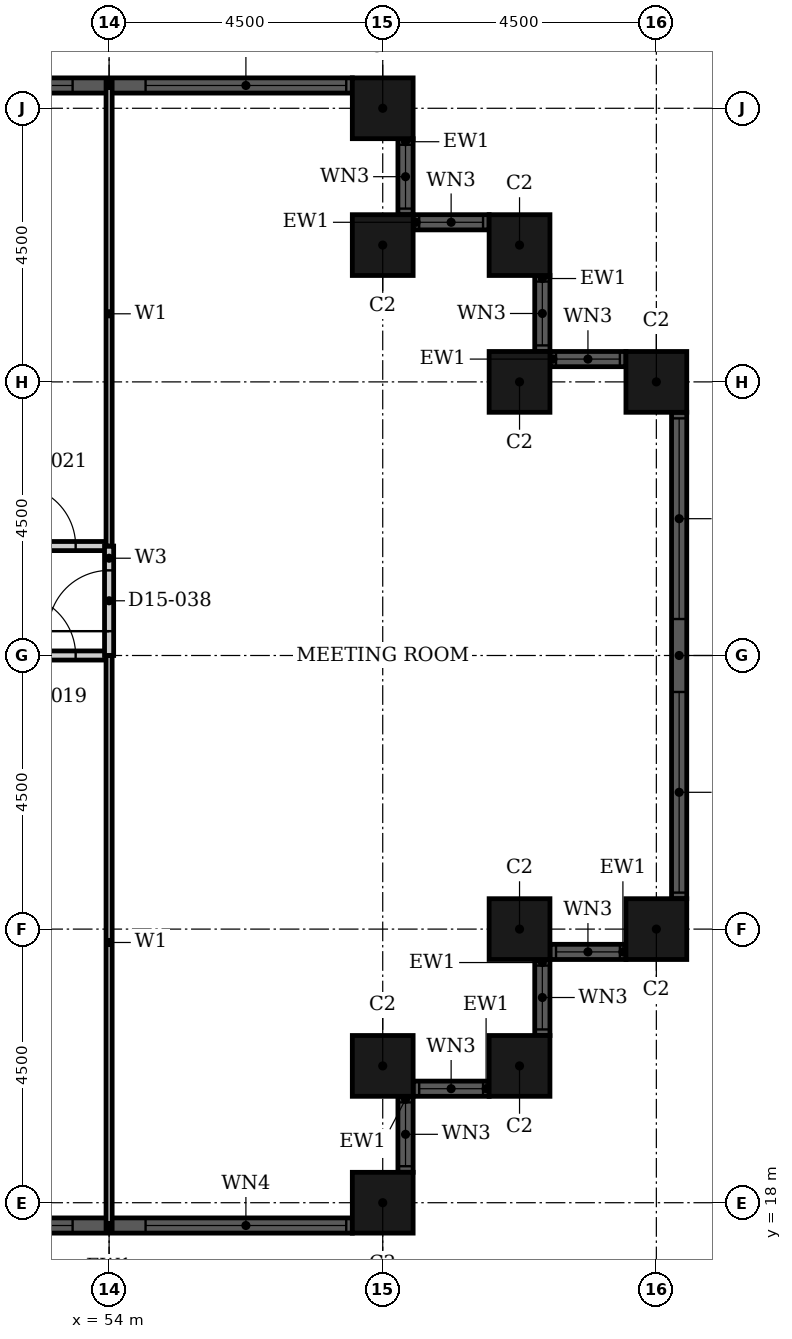
"""IFC4 building model, lengths in metres.
Left out: names, types, materials, properties, quantities, classifications, styles, units other than length and angle.
Written with IfcOpenShell. Run it as: python <this file> out.ifc"""

import sys

from ifc_helpers import new_model, si_unit, direction, frame, frame_2d, origin, origin_2d, place, context, subcontext, project, spatial, rectangle, hollow_rectangle, extrude, element, fill, save


model = new_model("IFC4")
c1 = context("Model", 3, precision=1e-05, world=origin(), true_north=direction((0.0, 1.0)))
c2 = subcontext(c1, "Body", "Model", "MODEL_VIEW")
j1 = project(units=[si_unit("LENGTHUNIT", "METRE"), si_unit("PLANEANGLEUNIT", "RADIAN")], contexts=[c1])
p1 = place(None, origin())
s1 = spatial("IfcSite", under=j1, at=p1, CompositionType="ELEMENT")
p2 = place(p1, origin())
s2 = spatial("IfcBuilding", under=s1, at=p2, CompositionType="ELEMENT")
p3 = place(p2, frame((0.0, 0.0, 67.2)))
s3 = spatial("IfcBuildingStorey", under=s2, at=p3, CompositionType="ELEMENT", Elevation=67.2)
for number, where, z_axis, x_axis in (
    (1, (58.5, 18.0, 0.0), (0.0, 0.0, 1.0), (1.0, 0.0, 0.0)),
    (2, (58.5, 20.25, 0.0), (0.0, 0.0, 1.0), (1.0, 0.0, 0.0)),
    (3, (60.75, 20.25, 0.0), (0.0, 0.0, 1.0), (1.0, 0.0, 0.0)),
    (4, (60.75, 22.5, 0.0), (0.0, 0.0, 1.0), (1.0, 0.0, 0.0)),
    (5, (63.0, 22.5, 0.0), (0.0, 0.0, 1.0), (1.0, 0.0, 0.0)),
    (6, (63.0, 31.5, 0.0), (0.0, 0.0, 1.0), (1.0, 0.0, 0.0)),
    (7, (60.75, 31.5, 0.0), (0.0, 0.0, 1.0), (1.0, 0.0, 0.0)),
    (8, (60.75, 33.75, 0.0), (0.0, 0.0, 1.0), (1.0, 0.0, 0.0)),
    (9, (58.5, 33.75, 0.0), (0.0, 0.0, 1.0), (1.0, 0.0, 0.0)),
    (10, (58.5, 36.0, 0.0), (0.0, 0.0, 1.0), (1.0, 0.0, 0.0)),
):
    element("IfcColumn", number, at=place(p3, frame(where, z_axis=z_axis, x_axis=x_axis)), inside=s3, PredefinedType="COLUMN", context=c2, shape_type="SweptSolid", body=[
        extrude(hollow_rectangle(XDim=1.0, YDim=1.0, WallThickness=0.032, at=origin_2d()), origin(), (0.0, 0.0, 1.0), 3.6),
    ])
p4 = place(p3, frame((50.0, 17.625, 0.0), z_axis=(0.0, 0.0, 1.0), x_axis=(1.0, 0.0, 0.0)))
e11 = element("IfcWall", 11, at=p4, inside=s3, PredefinedType="SOLIDWALL", context=c2, shape_type="SweptSolid", body=[
    extrude(rectangle(XDim=8.0, YDim=0.25, at=frame_2d((4.0, 0.0))), origin(), (0.0, 0.0, 1.0), 3.6),
])
p5 = place(p4, frame((0.1, 0.0, 0.9)))
e12 = element("IfcOpeningElement", 12, at=p5, cuts=e11, PredefinedType="OPENING", context=c2, shape_type="SweptSolid", body=[
    extrude(rectangle(XDim=3.3, YDim=2.08, at=frame_2d((1.65, 1.04))), frame((0.0, 0.135, 0.0), z_axis=(0.0, -1.0, 0.0), x_axis=(1.0, 0.0, 0.0)), (0.0, 0.0, 1.0), 0.27),
])
p6 = place(p4, frame((4.6, 0.0, 0.9)))
e13 = element("IfcOpeningElement", 13, at=p6, cuts=e11, PredefinedType="OPENING", context=c2, shape_type="SweptSolid", body=[
    extrude(rectangle(XDim=3.3, YDim=2.08, at=frame_2d((1.65, 1.04))), frame((0.0, 0.135, 0.0), z_axis=(0.0, -1.0, 0.0), x_axis=(1.0, 0.0, 0.0)), (0.0, 0.0, 1.0), 0.27),
])
p7 = place(p3, frame((58.875, 18.5, 0.0), z_axis=(0.0, 0.0, 1.0), x_axis=(0.0, 1.0, 0.0)))
e14 = element("IfcWall", 14, at=p7, inside=s3, PredefinedType="SOLIDWALL", context=c2, shape_type="SweptSolid", body=[
    extrude(rectangle(XDim=1.25, YDim=0.25, at=frame_2d((0.625, 0.0))), origin(), (0.0, 0.0, 1.0), 3.6),
])
p8 = place(p7, frame((0.1, 0.0, 0.9)))
e15 = element("IfcOpeningElement", 15, at=p8, cuts=e14, PredefinedType="OPENING", context=c2, shape_type="SweptSolid", body=[
    extrude(rectangle(XDim=1.05, YDim=2.08, at=frame_2d((0.525, 1.04))), frame((0.0, 0.135, 0.0), z_axis=(0.0, -1.0, 0.0), x_axis=(1.0, 0.0, 0.0)), (0.0, 0.0, 1.0), 0.27),
])
p9 = place(p3, frame((59.0, 19.875, 0.0), z_axis=(0.0, 0.0, 1.0), x_axis=(1.0, 0.0, 0.0)))
e16 = element("IfcWall", 16, at=p9, inside=s3, PredefinedType="SOLIDWALL", context=c2, shape_type="SweptSolid", body=[
    extrude(rectangle(XDim=1.25, YDim=0.25, at=frame_2d((0.625, 0.0))), origin(), (0.0, 0.0, 1.0), 3.6),
])
p10 = place(p9, frame((0.1, 0.0, 0.9)))
e17 = element("IfcOpeningElement", 17, at=p10, cuts=e16, PredefinedType="OPENING", context=c2, shape_type="SweptSolid", body=[
    extrude(rectangle(XDim=1.05, YDim=2.08, at=frame_2d((0.525, 1.04))), frame((0.0, 0.135, 0.0), z_axis=(0.0, -1.0, 0.0), x_axis=(1.0, 0.0, 0.0)), (0.0, 0.0, 1.0), 0.27),
])
p11 = place(p3, frame((61.125, 20.75, 0.0), z_axis=(0.0, 0.0, 1.0), x_axis=(0.0, 1.0, 0.0)))
e18 = element("IfcWall", 18, at=p11, inside=s3, PredefinedType="SOLIDWALL", context=c2, shape_type="SweptSolid", body=[
    extrude(rectangle(XDim=1.25, YDim=0.25, at=frame_2d((0.625, 0.0))), origin(), (0.0, 0.0, 1.0), 3.6),
])
p12 = place(p11, frame((0.1, 0.0, 0.9)))
e19 = element("IfcOpeningElement", 19, at=p12, cuts=e18, PredefinedType="OPENING", context=c2, shape_type="SweptSolid", body=[
    extrude(rectangle(XDim=1.05, YDim=2.08, at=frame_2d((0.525, 1.04))), frame((0.0, 0.135, 0.0), z_axis=(0.0, -1.0, 0.0), x_axis=(1.0, 0.0, 0.0)), (0.0, 0.0, 1.0), 0.27),
])
p13 = place(p3, frame((61.25, 22.125, 0.0), z_axis=(0.0, 0.0, 1.0), x_axis=(1.0, 0.0, 0.0)))
e20 = element("IfcWall", 20, at=p13, inside=s3, PredefinedType="SOLIDWALL", context=c2, shape_type="SweptSolid", body=[
    extrude(rectangle(XDim=1.25, YDim=0.25, at=frame_2d((0.625, 0.0))), origin(), (0.0, 0.0, 1.0), 3.6),
])
p14 = place(p13, frame((0.1, 0.0, 0.9)))
e21 = element("IfcOpeningElement", 21, at=p14, cuts=e20, PredefinedType="OPENING", context=c2, shape_type="SweptSolid", body=[
    extrude(rectangle(XDim=1.05, YDim=2.08, at=frame_2d((0.525, 1.04))), frame((0.0, 0.135, 0.0), z_axis=(0.0, -1.0, 0.0), x_axis=(1.0, 0.0, 0.0)), (0.0, 0.0, 1.0), 0.27),
])
p15 = place(p3, frame((63.375, 23.0, 0.0), z_axis=(0.0, 0.0, 1.0), x_axis=(0.0, 1.0, 0.0)))
e22 = element("IfcWall", 22, at=p15, inside=s3, PredefinedType="SOLIDWALL", context=c2, shape_type="SweptSolid", body=[
    extrude(rectangle(XDim=8.0, YDim=0.25, at=frame_2d((4.0, 0.0))), origin(), (0.0, 0.0, 1.0), 3.6),
])
p16 = place(p15, frame((0.1, 0.0, 0.9)))
e23 = element("IfcOpeningElement", 23, at=p16, cuts=e22, PredefinedType="OPENING", context=c2, shape_type="SweptSolid", body=[
    extrude(rectangle(XDim=3.3, YDim=2.08, at=frame_2d((1.65, 1.04))), frame((0.0, 0.135, 0.0), z_axis=(0.0, -1.0, 0.0), x_axis=(1.0, 0.0, 0.0)), (0.0, 0.0, 1.0), 0.27),
])
p17 = place(p15, frame((4.6, 0.0, 0.9)))
e24 = element("IfcOpeningElement", 24, at=p17, cuts=e22, PredefinedType="OPENING", context=c2, shape_type="SweptSolid", body=[
    extrude(rectangle(XDim=3.3, YDim=2.08, at=frame_2d((1.65, 1.04))), frame((0.0, 0.135, 0.0), z_axis=(0.0, -1.0, 0.0), x_axis=(1.0, 0.0, 0.0)), (0.0, 0.0, 1.0), 0.27),
])
p18 = place(p3, frame((62.5, 31.875, 0.0), z_axis=(0.0, 0.0, 1.0), x_axis=(-1.0, 0.0, 0.0)))
e25 = element("IfcWall", 25, at=p18, inside=s3, PredefinedType="SOLIDWALL", context=c2, shape_type="SweptSolid", body=[
    extrude(rectangle(XDim=1.25, YDim=0.25, at=frame_2d((0.625, 0.0))), origin(), (0.0, 0.0, 1.0), 3.6),
])
p19 = place(p18, frame((0.1, 0.0, 0.9)))
e26 = element("IfcOpeningElement", 26, at=p19, cuts=e25, PredefinedType="OPENING", context=c2, shape_type="SweptSolid", body=[
    extrude(rectangle(XDim=1.05, YDim=2.08, at=frame_2d((0.525, 1.04))), frame((0.0, 0.135, 0.0), z_axis=(0.0, -1.0, 0.0), x_axis=(1.0, 0.0, 0.0)), (0.0, 0.0, 1.0), 0.27),
])
p20 = place(p3, frame((61.125, 32.0, 0.0), z_axis=(0.0, 0.0, 1.0), x_axis=(0.0, 1.0, 0.0)))
e27 = element("IfcWall", 27, at=p20, inside=s3, PredefinedType="SOLIDWALL", context=c2, shape_type="SweptSolid", body=[
    extrude(rectangle(XDim=1.25, YDim=0.25, at=frame_2d((0.625, 0.0))), origin(), (0.0, 0.0, 1.0), 3.6),
])
p21 = place(p20, frame((0.1, 0.0, 0.9)))
e28 = element("IfcOpeningElement", 28, at=p21, cuts=e27, PredefinedType="OPENING", context=c2, shape_type="SweptSolid", body=[
    extrude(rectangle(XDim=1.05, YDim=2.08, at=frame_2d((0.525, 1.04))), frame((0.0, 0.135, 0.0), z_axis=(0.0, -1.0, 0.0), x_axis=(1.0, 0.0, 0.0)), (0.0, 0.0, 1.0), 0.27),
])
p22 = place(p3, frame((60.25, 34.125, 0.0), z_axis=(0.0, 0.0, 1.0), x_axis=(-1.0, 0.0, 0.0)))
e29 = element("IfcWall", 29, at=p22, inside=s3, PredefinedType="SOLIDWALL", context=c2, shape_type="SweptSolid", body=[
    extrude(rectangle(XDim=1.25, YDim=0.25, at=frame_2d((0.625, 0.0))), origin(), (0.0, 0.0, 1.0), 3.6),
])
p23 = place(p22, frame((0.1, 0.0, 0.9)))
e30 = element("IfcOpeningElement", 30, at=p23, cuts=e29, PredefinedType="OPENING", context=c2, shape_type="SweptSolid", body=[
    extrude(rectangle(XDim=1.05, YDim=2.08, at=frame_2d((0.525, 1.04))), frame((0.0, 0.135, 0.0), z_axis=(0.0, -1.0, 0.0), x_axis=(1.0, 0.0, 0.0)), (0.0, 0.0, 1.0), 0.27),
])
p24 = place(p3, frame((58.875, 34.25, 0.0), z_axis=(0.0, 0.0, 1.0), x_axis=(0.0, 1.0, 0.0)))
e31 = element("IfcWall", 31, at=p24, inside=s3, PredefinedType="SOLIDWALL", context=c2, shape_type="SweptSolid", body=[
    extrude(rectangle(XDim=1.25, YDim=0.25, at=frame_2d((0.625, 0.0))), origin(), (0.0, 0.0, 1.0), 3.6),
])
p25 = place(p24, frame((0.1, 0.0, 0.9)))
e32 = element("IfcOpeningElement", 32, at=p25, cuts=e31, PredefinedType="OPENING", context=c2, shape_type="SweptSolid", body=[
    extrude(rectangle(XDim=1.05, YDim=2.08, at=frame_2d((0.525, 1.04))), frame((0.0, 0.135, 0.0), z_axis=(0.0, -1.0, 0.0), x_axis=(1.0, 0.0, 0.0)), (0.0, 0.0, 1.0), 0.27),
])
p26 = place(p3, frame((58.0, 36.375, 0.0), z_axis=(0.0, 0.0, 1.0), x_axis=(-1.0, 0.0, 0.0)))
e33 = element("IfcWall", 33, at=p26, inside=s3, PredefinedType="SOLIDWALL", context=c2, shape_type="SweptSolid", body=[
    extrude(rectangle(XDim=8.0, YDim=0.25, at=frame_2d((4.0, 0.0))), origin(), (0.0, 0.0, 1.0), 3.6),
])
p27 = place(p26, frame((0.1, 0.0, 0.9)))
e34 = element("IfcOpeningElement", 34, at=p27, cuts=e33, PredefinedType="OPENING", context=c2, shape_type="SweptSolid", body=[
    extrude(rectangle(XDim=3.3, YDim=2.08, at=frame_2d((1.65, 1.04))), frame((0.0, 0.135, 0.0), z_axis=(0.0, -1.0, 0.0), x_axis=(1.0, 0.0, 0.0)), (0.0, 0.0, 1.0), 0.27),
])
p28 = place(p26, frame((4.6, 0.0, 0.9)))
e35 = element("IfcOpeningElement", 35, at=p28, cuts=e33, PredefinedType="OPENING", context=c2, shape_type="SweptSolid", body=[
    extrude(rectangle(XDim=3.3, YDim=2.08, at=frame_2d((1.65, 1.04))), frame((0.0, 0.135, 0.0), z_axis=(0.0, -1.0, 0.0), x_axis=(1.0, 0.0, 0.0)), (0.0, 0.0, 1.0), 0.27),
])
p29 = place(p3, frame((46.8, 27.0, 0.0), z_axis=(0.0, 0.0, 1.0), x_axis=(1.0, 0.0, 0.0)))
e36 = element("IfcWall", 36, at=p29, inside=s3, PredefinedType="PARTITIONING", context=c2, shape_type="SweptSolid", body=[
    extrude(rectangle(XDim=7.2, YDim=0.15, at=frame_2d((3.6, 0.0))), origin(), (0.0, 0.0, 1.0), 2.58),
])
p30 = place(p29, frame((5.65, 0.0, 0.0)))
e37 = element("IfcOpeningElement", 37, at=p30, cuts=e36, PredefinedType="OPENING", context=c2, shape_type="SweptSolid", body=[
    extrude(rectangle(XDim=1.0, YDim=2.1, at=frame_2d((0.5, 1.05))), frame((0.0, 0.085, 0.0), z_axis=(0.0, -1.0, 0.0), x_axis=(1.0, 0.0, 0.0)), (0.0, 0.0, 1.0), 0.17),
])
p31 = place(p3, frame((46.8, 28.8, 0.0), z_axis=(0.0, 0.0, 1.0), x_axis=(1.0, 0.0, 0.0)))
e38 = element("IfcWall", 38, at=p31, inside=s3, PredefinedType="PARTITIONING", context=c2, shape_type="SweptSolid", body=[
    extrude(rectangle(XDim=7.2, YDim=0.15, at=frame_2d((3.6, 0.0))), origin(), (0.0, 0.0, 1.0), 3.3),
])
p32 = place(p31, frame((5.65, 0.0, 0.0)))
e39 = element("IfcOpeningElement", 39, at=p32, cuts=e38, PredefinedType="OPENING", context=c2, shape_type="SweptSolid", body=[
    extrude(rectangle(XDim=1.0, YDim=2.1, at=frame_2d((0.5, 1.05))), frame((0.0, 0.085, 0.0), z_axis=(0.0, -1.0, 0.0), x_axis=(1.0, 0.0, 0.0)), (0.0, 0.0, 1.0), 0.17),
])
p33 = place(p3, frame((54.0, 27.0, 0.0), z_axis=(0.0, 0.0, 1.0), x_axis=(0.0, 1.0, 0.0)))
e40 = element("IfcWall", 40, at=p33, inside=s3, PredefinedType="PARTITIONING", context=c2, shape_type="SweptSolid", body=[
    extrude(rectangle(XDim=1.8, YDim=0.15, at=frame_2d((0.9, 0.0))), origin(), (0.0, 0.0, 1.0), 3.3),
])
p34 = place(p33, frame((0.4, 0.0, 0.0)))
e41 = element("IfcOpeningElement", 41, at=p34, cuts=e40, PredefinedType="OPENING", context=c2, shape_type="SweptSolid", body=[
    extrude(rectangle(XDim=1.0, YDim=2.1, at=frame_2d((0.5, 1.05))), frame((0.0, 0.085, 0.0), z_axis=(0.0, -1.0, 0.0), x_axis=(1.0, 0.0, 0.0)), (0.0, 0.0, 1.0), 0.17),
])
p35 = place(p3, frame((54.0, 28.8, 0.0), z_axis=(0.0, 0.0, 1.0), x_axis=(0.0, 1.0, 0.0)))
e42 = element("IfcWall", 42, at=p35, inside=s3, PredefinedType="PARTITIONING", context=c2, shape_type="SweptSolid", body=[
    extrude(rectangle(XDim=7.64, YDim=0.1, at=frame_2d((3.82, 0.0))), origin(), (0.0, 0.0, 1.0), 3.3),
])
p36 = place(p3, frame((54.0, 17.56, 0.0), z_axis=(0.0, 0.0, 1.0), x_axis=(0.0, 1.0, 0.0)))
e43 = element("IfcWall", 43, at=p36, inside=s3, PredefinedType="PARTITIONING", context=c2, shape_type="SweptSolid", body=[
    extrude(rectangle(XDim=9.44, YDim=0.1, at=frame_2d((4.72, 0.0))), origin(), (0.0, 0.0, 1.0), 3.3),
])
p37 = place(p5, origin())
e44 = element("IfcWindow", 44, at=p37, inside=s3, PartitioningType="SINGLE_PANEL", PredefinedType="WINDOW", context=c2, shape_type="SweptSolid", body=[
    extrude(rectangle(XDim=3.3, YDim=2.08, at=frame_2d((1.65, 1.04))), frame((0.0, 0.03, 0.0), z_axis=(0.0, -1.0, 0.0), x_axis=(1.0, 0.0, 0.0)), (0.0, 0.0, 1.0), 0.06),
])
fill(e12, e44)
p38 = place(p6, origin())
e45 = element("IfcWindow", 45, at=p38, inside=s3, PartitioningType="SINGLE_PANEL", PredefinedType="WINDOW", context=c2, shape_type="SweptSolid", body=[
    extrude(rectangle(XDim=3.3, YDim=2.08, at=frame_2d((1.65, 1.04))), frame((0.0, 0.03, 0.0), z_axis=(0.0, -1.0, 0.0), x_axis=(1.0, 0.0, 0.0)), (0.0, 0.0, 1.0), 0.06),
])
fill(e13, e45)
p39 = place(p8, origin())
e46 = element("IfcWindow", 46, at=p39, inside=s3, PartitioningType="SINGLE_PANEL", PredefinedType="WINDOW", context=c2, shape_type="SweptSolid", body=[
    extrude(rectangle(XDim=1.05, YDim=2.08, at=frame_2d((0.525, 1.04))), frame((0.0, 0.03, 0.0), z_axis=(0.0, -1.0, 0.0), x_axis=(1.0, 0.0, 0.0)), (0.0, 0.0, 1.0), 0.06),
])
fill(e15, e46)
p40 = place(p10, origin())
e47 = element("IfcWindow", 47, at=p40, inside=s3, PartitioningType="SINGLE_PANEL", PredefinedType="WINDOW", context=c2, shape_type="SweptSolid", body=[
    extrude(rectangle(XDim=1.05, YDim=2.08, at=frame_2d((0.525, 1.04))), frame((0.0, 0.03, 0.0), z_axis=(0.0, -1.0, 0.0), x_axis=(1.0, 0.0, 0.0)), (0.0, 0.0, 1.0), 0.06),
])
fill(e17, e47)
p41 = place(p12, origin())
e48 = element("IfcWindow", 48, at=p41, inside=s3, PartitioningType="SINGLE_PANEL", PredefinedType="WINDOW", context=c2, shape_type="SweptSolid", body=[
    extrude(rectangle(XDim=1.05, YDim=2.08, at=frame_2d((0.525, 1.04))), frame((0.0, 0.03, 0.0), z_axis=(0.0, -1.0, 0.0), x_axis=(1.0, 0.0, 0.0)), (0.0, 0.0, 1.0), 0.06),
])
fill(e19, e48)
p42 = place(p14, origin())
e49 = element("IfcWindow", 49, at=p42, inside=s3, PartitioningType="SINGLE_PANEL", PredefinedType="WINDOW", context=c2, shape_type="SweptSolid", body=[
    extrude(rectangle(XDim=1.05, YDim=2.08, at=frame_2d((0.525, 1.04))), frame((0.0, 0.03, 0.0), z_axis=(0.0, -1.0, 0.0), x_axis=(1.0, 0.0, 0.0)), (0.0, 0.0, 1.0), 0.06),
])
fill(e21, e49)
p43 = place(p16, origin())
e50 = element("IfcWindow", 50, at=p43, inside=s3, PartitioningType="SINGLE_PANEL", PredefinedType="WINDOW", context=c2, shape_type="SweptSolid", body=[
    extrude(rectangle(XDim=3.3, YDim=2.08, at=frame_2d((1.65, 1.04))), frame((0.0, 0.03, 0.0), z_axis=(0.0, -1.0, 0.0), x_axis=(1.0, 0.0, 0.0)), (0.0, 0.0, 1.0), 0.06),
])
fill(e23, e50)
p44 = place(p17, origin())
e51 = element("IfcWindow", 51, at=p44, inside=s3, PartitioningType="SINGLE_PANEL", PredefinedType="WINDOW", context=c2, shape_type="SweptSolid", body=[
    extrude(rectangle(XDim=3.3, YDim=2.08, at=frame_2d((1.65, 1.04))), frame((0.0, 0.03, 0.0), z_axis=(0.0, -1.0, 0.0), x_axis=(1.0, 0.0, 0.0)), (0.0, 0.0, 1.0), 0.06),
])
fill(e24, e51)
p45 = place(p19, origin())
e52 = element("IfcWindow", 52, at=p45, inside=s3, PartitioningType="SINGLE_PANEL", PredefinedType="WINDOW", context=c2, shape_type="SweptSolid", body=[
    extrude(rectangle(XDim=1.05, YDim=2.08, at=frame_2d((0.525, 1.04))), frame((0.0, 0.03, 0.0), z_axis=(0.0, -1.0, 0.0), x_axis=(1.0, 0.0, 0.0)), (0.0, 0.0, 1.0), 0.06),
])
fill(e26, e52)
p46 = place(p21, origin())
e53 = element("IfcWindow", 53, at=p46, inside=s3, PartitioningType="SINGLE_PANEL", PredefinedType="WINDOW", context=c2, shape_type="SweptSolid", body=[
    extrude(rectangle(XDim=1.05, YDim=2.08, at=frame_2d((0.525, 1.04))), frame((0.0, 0.03, 0.0), z_axis=(0.0, -1.0, 0.0), x_axis=(1.0, 0.0, 0.0)), (0.0, 0.0, 1.0), 0.06),
])
fill(e28, e53)
p47 = place(p23, origin())
e54 = element("IfcWindow", 54, at=p47, inside=s3, PartitioningType="SINGLE_PANEL", PredefinedType="WINDOW", context=c2, shape_type="SweptSolid", body=[
    extrude(rectangle(XDim=1.05, YDim=2.08, at=frame_2d((0.525, 1.04))), frame((0.0, 0.03, 0.0), z_axis=(0.0, -1.0, 0.0), x_axis=(1.0, 0.0, 0.0)), (0.0, 0.0, 1.0), 0.06),
])
fill(e30, e54)
p48 = place(p25, origin())
e55 = element("IfcWindow", 55, at=p48, inside=s3, PartitioningType="SINGLE_PANEL", PredefinedType="WINDOW", context=c2, shape_type="SweptSolid", body=[
    extrude(rectangle(XDim=1.05, YDim=2.08, at=frame_2d((0.525, 1.04))), frame((0.0, 0.03, 0.0), z_axis=(0.0, -1.0, 0.0), x_axis=(1.0, 0.0, 0.0)), (0.0, 0.0, 1.0), 0.06),
])
fill(e32, e55)
p49 = place(p27, origin())
e56 = element("IfcWindow", 56, at=p49, inside=s3, PartitioningType="SINGLE_PANEL", PredefinedType="WINDOW", context=c2, shape_type="SweptSolid", body=[
    extrude(rectangle(XDim=3.3, YDim=2.08, at=frame_2d((1.65, 1.04))), frame((0.0, 0.03, 0.0), z_axis=(0.0, -1.0, 0.0), x_axis=(1.0, 0.0, 0.0)), (0.0, 0.0, 1.0), 0.06),
])
fill(e34, e56)
p50 = place(p28, origin())
e57 = element("IfcWindow", 57, at=p50, inside=s3, PartitioningType="SINGLE_PANEL", PredefinedType="WINDOW", context=c2, shape_type="SweptSolid", body=[
    extrude(rectangle(XDim=3.3, YDim=2.08, at=frame_2d((1.65, 1.04))), frame((0.0, 0.03, 0.0), z_axis=(0.0, -1.0, 0.0), x_axis=(1.0, 0.0, 0.0)), (0.0, 0.0, 1.0), 0.06),
])
fill(e35, e57)
p51 = place(p30, origin())
e58 = element("IfcDoor", 58, at=p51, inside=s3, OperationType="SINGLE_SWING_RIGHT", PredefinedType="DOOR", context=c2, shape_type="SweptSolid", body=[
    extrude(rectangle(XDim=1.0, YDim=2.1, at=frame_2d((0.5, 1.05))), frame((0.0, 0.025, 0.0), z_axis=(0.0, -1.0, 0.0), x_axis=(1.0, 0.0, 0.0)), (0.0, 0.0, 1.0), 0.05),
])
fill(e37, e58)
p52 = place(p32, origin())
e59 = element("IfcDoor", 59, at=p52, inside=s3, OperationType="SINGLE_SWING_RIGHT", PredefinedType="DOOR", context=c2, shape_type="SweptSolid", body=[
    extrude(rectangle(XDim=1.0, YDim=2.1, at=frame_2d((0.5, 1.05))), frame((0.0, 0.025, 0.0), z_axis=(0.0, -1.0, 0.0), x_axis=(1.0, 0.0, 0.0)), (0.0, 0.0, 1.0), 0.05),
])
fill(e39, e59)
p53 = place(p34, origin())
e60 = element("IfcDoor", 60, at=p53, inside=s3, OperationType="SINGLE_SWING_RIGHT", PredefinedType="DOOR", context=c2, shape_type="SweptSolid", body=[
    extrude(rectangle(XDim=1.0, YDim=2.1, at=frame_2d((0.5, 1.05))), frame((0.0, 0.025, 0.0), z_axis=(0.0, -1.0, 0.0), x_axis=(1.0, 0.0, 0.0)), (0.0, 0.0, 1.0), 0.05),
])
fill(e41, e60)
save(model, sys.argv[1])
